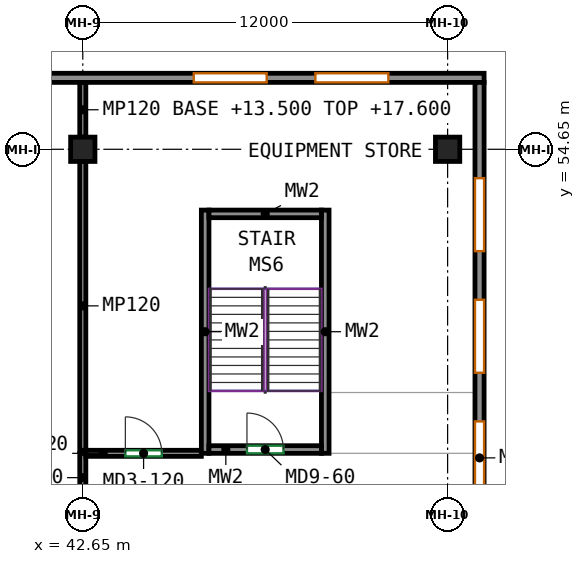
"""IFC4 building model, lengths in metres.
Left out: names, types, materials, properties, quantities, classifications, styles, units other than length and angle.
Written with IfcOpenShell. Run it as: python <this file> out.ifc"""

import sys

from ifc_helpers import new_model, si_unit, direction, frame, frame_2d, origin, origin_2d, place, context, subcontext, project, spatial, rectangle, extrude, source, transform, mapped, element, fill, save


model = new_model("IFC4")
c1 = context("Model", 3, precision=1e-05, world=origin(), true_north=direction((0.0, 1.0)))
c2 = subcontext(c1, "Body", "Model", "MODEL_VIEW")
j1 = project(units=[si_unit("LENGTHUNIT", "METRE"), si_unit("PLANEANGLEUNIT", "RADIAN")], contexts=[c1])
p1 = place(None, origin())
s1 = spatial("IfcSite", under=j1, at=p1, CompositionType="ELEMENT")
p2 = place(p1, origin())
s2 = spatial("IfcBuilding", under=s1, at=p2, CompositionType="ELEMENT")
p3 = place(p2, frame((0.0, 0.0, 13.5)))
s3 = spatial("IfcBuildingStorey", under=s2, at=p3, CompositionType="ELEMENT", Elevation=13.5)
m1 = source(origin(), c2, "Body", "SweptSolid", [
    extrude(rectangle(XDim=0.8, YDim=0.8, at=origin_2d()), origin(), (0.0, 0.0, 1.0), 4.1),
])
for number, where, z_axis, x_axis in (
    (1, (42.65, 54.65, 0.0), (0.0, 0.0, 1.0), (1.0, 0.0, 0.0)),
    (2, (54.65, 54.65, 0.0), (0.0, 0.0, 1.0), (1.0, 0.0, 0.0)),
):
    element("IfcColumn", number, at=place(p3, frame(where, z_axis=z_axis, x_axis=x_axis)), inside=s3, PredefinedType="COLUMN", context=c2, shape_type="MappedRepresentation", body=[
        mapped(m1, transform((0.0, 0.0, 0.0))),
    ])
m2 = source(origin(), c2, "Body", "SweptSolid", [
    extrude(rectangle(XDim=8.0, YDim=0.25, at=frame_2d((4.0, 0.0))), origin(), (0.0, 0.0, 1.0), 4.1),
])
for number, where, z_axis, x_axis in (
    (3, (46.675, 44.65, 0.0), (0.0, 0.0, 1.0), (0.0, 1.0, 0.0)),
    (4, (50.625, 44.65, 0.0), (0.0, 0.0, 1.0), (0.0, 1.0, 0.0)),
):
    element("IfcWall", number, at=place(p3, frame(where, z_axis=z_axis, x_axis=x_axis)), inside=s3, PredefinedType="SHEAR", context=c2, shape_type="MappedRepresentation", body=[
        mapped(m2, transform((0.0, 0.0, 0.0))),
    ])
m3 = source(origin(), c2, "Body", "SweptSolid", [
    extrude(rectangle(XDim=3.7, YDim=0.25, at=frame_2d((1.85, 0.0))), origin(), (0.0, 0.0, 1.0), 4.1),
])
p4 = place(p3, frame((46.8, 44.775, 0.0), z_axis=(0.0, 0.0, 1.0), x_axis=(1.0, 0.0, 0.0)))
e5 = element("IfcWall", 5, at=p4, inside=s3, PredefinedType="SHEAR", context=c2, shape_type="MappedRepresentation", body=[
    mapped(m3, transform((0.0, 0.0, 0.0))),
])
p5 = place(p4, frame((1.25, 0.0, 0.0)))
e6 = element("IfcOpeningElement", 6, at=p5, cuts=e5, PredefinedType="OPENING", context=c2, shape_type="SweptSolid", body=[
    extrude(rectangle(XDim=1.2, YDim=2.1, at=frame_2d((0.6, 1.05))), frame((0.0, 0.135, 0.0), z_axis=(0.0, -1.0, 0.0), x_axis=(1.0, 0.0, 0.0)), (0.0, 0.0, 1.0), 0.27),
])
p6 = place(p3, frame((46.8, 52.525, 0.0), z_axis=(0.0, 0.0, 1.0), x_axis=(1.0, 0.0, 0.0)))
e7 = element("IfcWall", 7, at=p6, inside=s3, PredefinedType="SHEAR", context=c2, shape_type="MappedRepresentation", body=[
    mapped(m3, transform((0.0, 0.0, 0.0))),
])
m4 = source(origin(), c2, "Body", "SweptSolid", [
    extrude(rectangle(XDim=112.7, YDim=0.3, at=frame_2d((56.35, 0.0))), origin(), (0.0, 0.0, 1.0), 4.1),
])
p7 = place(p3, frame((-56.85, 57.0, 0.0), z_axis=(0.0, 0.0, 1.0), x_axis=(1.0, 0.0, 0.0)))
e8 = element("IfcWall", 8, at=p7, inside=s3, PredefinedType="SOLIDWALL", context=c2, shape_type="MappedRepresentation", body=[
    mapped(m4, transform((0.0, 0.0, 0.0))),
])
p8 = place(p7, frame((3.15, 0.0, 0.9)))
e9 = element("IfcOpeningElement", 9, at=p8, cuts=e8, PredefinedType="OPENING", context=c2, shape_type="SweptSolid", body=[
    extrude(rectangle(XDim=2.4, YDim=1.8, at=frame_2d((1.2, 0.9))), frame((0.0, 0.16, 0.0), z_axis=(0.0, -1.0, 0.0), x_axis=(1.0, 0.0, 0.0)), (0.0, 0.0, 1.0), 0.32),
])
p9 = place(p7, frame((7.15, 0.0, 0.9)))
e10 = element("IfcOpeningElement", 10, at=p9, cuts=e8, PredefinedType="OPENING", context=c2, shape_type="SweptSolid", body=[
    extrude(rectangle(XDim=2.4, YDim=1.8, at=frame_2d((1.2, 0.9))), frame((0.0, 0.16, 0.0), z_axis=(0.0, -1.0, 0.0), x_axis=(1.0, 0.0, 0.0)), (0.0, 0.0, 1.0), 0.32),
])
p10 = place(p7, frame((11.15, 0.0, 0.9)))
e11 = element("IfcOpeningElement", 11, at=p10, cuts=e8, PredefinedType="OPENING", context=c2, shape_type="SweptSolid", body=[
    extrude(rectangle(XDim=2.4, YDim=1.8, at=frame_2d((1.2, 0.9))), frame((0.0, 0.16, 0.0), z_axis=(0.0, -1.0, 0.0), x_axis=(1.0, 0.0, 0.0)), (0.0, 0.0, 1.0), 0.32),
])
p11 = place(p7, frame((15.15, 0.0, 0.9)))
e12 = element("IfcOpeningElement", 12, at=p11, cuts=e8, PredefinedType="OPENING", context=c2, shape_type="SweptSolid", body=[
    extrude(rectangle(XDim=2.4, YDim=1.8, at=frame_2d((1.2, 0.9))), frame((0.0, 0.16, 0.0), z_axis=(0.0, -1.0, 0.0), x_axis=(1.0, 0.0, 0.0)), (0.0, 0.0, 1.0), 0.32),
])
p12 = place(p7, frame((19.15, 0.0, 0.9)))
e13 = element("IfcOpeningElement", 13, at=p12, cuts=e8, PredefinedType="OPENING", context=c2, shape_type="SweptSolid", body=[
    extrude(rectangle(XDim=2.4, YDim=1.8, at=frame_2d((1.2, 0.9))), frame((0.0, 0.16, 0.0), z_axis=(0.0, -1.0, 0.0), x_axis=(1.0, 0.0, 0.0)), (0.0, 0.0, 1.0), 0.32),
])
p13 = place(p7, frame((23.15, 0.0, 0.9)))
e14 = element("IfcOpeningElement", 14, at=p13, cuts=e8, PredefinedType="OPENING", context=c2, shape_type="SweptSolid", body=[
    extrude(rectangle(XDim=2.4, YDim=1.8, at=frame_2d((1.2, 0.9))), frame((0.0, 0.16, 0.0), z_axis=(0.0, -1.0, 0.0), x_axis=(1.0, 0.0, 0.0)), (0.0, 0.0, 1.0), 0.32),
])
p14 = place(p7, frame((27.15, 0.0, 0.9)))
e15 = element("IfcOpeningElement", 15, at=p14, cuts=e8, PredefinedType="OPENING", context=c2, shape_type="SweptSolid", body=[
    extrude(rectangle(XDim=2.4, YDim=1.8, at=frame_2d((1.2, 0.9))), frame((0.0, 0.16, 0.0), z_axis=(0.0, -1.0, 0.0), x_axis=(1.0, 0.0, 0.0)), (0.0, 0.0, 1.0), 0.32),
])
p15 = place(p7, frame((31.15, 0.0, 0.9)))
e16 = element("IfcOpeningElement", 16, at=p15, cuts=e8, PredefinedType="OPENING", context=c2, shape_type="SweptSolid", body=[
    extrude(rectangle(XDim=2.4, YDim=1.8, at=frame_2d((1.2, 0.9))), frame((0.0, 0.16, 0.0), z_axis=(0.0, -1.0, 0.0), x_axis=(1.0, 0.0, 0.0)), (0.0, 0.0, 1.0), 0.32),
])
p16 = place(p7, frame((35.15, 0.0, 0.9)))
e17 = element("IfcOpeningElement", 17, at=p16, cuts=e8, PredefinedType="OPENING", context=c2, shape_type="SweptSolid", body=[
    extrude(rectangle(XDim=2.4, YDim=1.8, at=frame_2d((1.2, 0.9))), frame((0.0, 0.16, 0.0), z_axis=(0.0, -1.0, 0.0), x_axis=(1.0, 0.0, 0.0)), (0.0, 0.0, 1.0), 0.32),
])
p17 = place(p7, frame((43.15, 0.0, 0.9)))
e18 = element("IfcOpeningElement", 18, at=p17, cuts=e8, PredefinedType="OPENING", context=c2, shape_type="SweptSolid", body=[
    extrude(rectangle(XDim=2.4, YDim=1.8, at=frame_2d((1.2, 0.9))), frame((0.0, 0.16, 0.0), z_axis=(0.0, -1.0, 0.0), x_axis=(1.0, 0.0, 0.0)), (0.0, 0.0, 1.0), 0.32),
])
p18 = place(p7, frame((47.15, 0.0, 0.9)))
e19 = element("IfcOpeningElement", 19, at=p18, cuts=e8, PredefinedType="OPENING", context=c2, shape_type="SweptSolid", body=[
    extrude(rectangle(XDim=2.4, YDim=1.8, at=frame_2d((1.2, 0.9))), frame((0.0, 0.16, 0.0), z_axis=(0.0, -1.0, 0.0), x_axis=(1.0, 0.0, 0.0)), (0.0, 0.0, 1.0), 0.32),
])
p19 = place(p7, frame((51.15, 0.0, 0.9)))
e20 = element("IfcOpeningElement", 20, at=p19, cuts=e8, PredefinedType="OPENING", context=c2, shape_type="SweptSolid", body=[
    extrude(rectangle(XDim=2.4, YDim=1.8, at=frame_2d((1.2, 0.9))), frame((0.0, 0.16, 0.0), z_axis=(0.0, -1.0, 0.0), x_axis=(1.0, 0.0, 0.0)), (0.0, 0.0, 1.0), 0.32),
])
p20 = place(p7, frame((55.15, 0.0, 0.9)))
e21 = element("IfcOpeningElement", 21, at=p20, cuts=e8, PredefinedType="OPENING", context=c2, shape_type="SweptSolid", body=[
    extrude(rectangle(XDim=2.4, YDim=1.8, at=frame_2d((1.2, 0.9))), frame((0.0, 0.16, 0.0), z_axis=(0.0, -1.0, 0.0), x_axis=(1.0, 0.0, 0.0)), (0.0, 0.0, 1.0), 0.32),
])
p21 = place(p7, frame((59.15, 0.0, 0.9)))
e22 = element("IfcOpeningElement", 22, at=p21, cuts=e8, PredefinedType="OPENING", context=c2, shape_type="SweptSolid", body=[
    extrude(rectangle(XDim=2.4, YDim=1.8, at=frame_2d((1.2, 0.9))), frame((0.0, 0.16, 0.0), z_axis=(0.0, -1.0, 0.0), x_axis=(1.0, 0.0, 0.0)), (0.0, 0.0, 1.0), 0.32),
])
p22 = place(p7, frame((63.15, 0.0, 0.9)))
e23 = element("IfcOpeningElement", 23, at=p22, cuts=e8, PredefinedType="OPENING", context=c2, shape_type="SweptSolid", body=[
    extrude(rectangle(XDim=2.4, YDim=1.8, at=frame_2d((1.2, 0.9))), frame((0.0, 0.16, 0.0), z_axis=(0.0, -1.0, 0.0), x_axis=(1.0, 0.0, 0.0)), (0.0, 0.0, 1.0), 0.32),
])
p23 = place(p7, frame((67.15, 0.0, 0.9)))
e24 = element("IfcOpeningElement", 24, at=p23, cuts=e8, PredefinedType="OPENING", context=c2, shape_type="SweptSolid", body=[
    extrude(rectangle(XDim=2.4, YDim=1.8, at=frame_2d((1.2, 0.9))), frame((0.0, 0.16, 0.0), z_axis=(0.0, -1.0, 0.0), x_axis=(1.0, 0.0, 0.0)), (0.0, 0.0, 1.0), 0.32),
])
p24 = place(p7, frame((71.15, 0.0, 0.9)))
e25 = element("IfcOpeningElement", 25, at=p24, cuts=e8, PredefinedType="OPENING", context=c2, shape_type="SweptSolid", body=[
    extrude(rectangle(XDim=2.4, YDim=1.8, at=frame_2d((1.2, 0.9))), frame((0.0, 0.16, 0.0), z_axis=(0.0, -1.0, 0.0), x_axis=(1.0, 0.0, 0.0)), (0.0, 0.0, 1.0), 0.32),
])
p25 = place(p7, frame((75.15, 0.0, 0.9)))
e26 = element("IfcOpeningElement", 26, at=p25, cuts=e8, PredefinedType="OPENING", context=c2, shape_type="SweptSolid", body=[
    extrude(rectangle(XDim=2.4, YDim=1.8, at=frame_2d((1.2, 0.9))), frame((0.0, 0.16, 0.0), z_axis=(0.0, -1.0, 0.0), x_axis=(1.0, 0.0, 0.0)), (0.0, 0.0, 1.0), 0.32),
])
p26 = place(p7, frame((79.15, 0.0, 0.9)))
e27 = element("IfcOpeningElement", 27, at=p26, cuts=e8, PredefinedType="OPENING", context=c2, shape_type="SweptSolid", body=[
    extrude(rectangle(XDim=2.4, YDim=1.8, at=frame_2d((1.2, 0.9))), frame((0.0, 0.16, 0.0), z_axis=(0.0, -1.0, 0.0), x_axis=(1.0, 0.0, 0.0)), (0.0, 0.0, 1.0), 0.32),
])
p27 = place(p7, frame((83.15, 0.0, 0.9)))
e28 = element("IfcOpeningElement", 28, at=p27, cuts=e8, PredefinedType="OPENING", context=c2, shape_type="SweptSolid", body=[
    extrude(rectangle(XDim=2.4, YDim=1.8, at=frame_2d((1.2, 0.9))), frame((0.0, 0.16, 0.0), z_axis=(0.0, -1.0, 0.0), x_axis=(1.0, 0.0, 0.0)), (0.0, 0.0, 1.0), 0.32),
])
p28 = place(p7, frame((87.15, 0.0, 0.9)))
e29 = element("IfcOpeningElement", 29, at=p28, cuts=e8, PredefinedType="OPENING", context=c2, shape_type="SweptSolid", body=[
    extrude(rectangle(XDim=2.4, YDim=1.8, at=frame_2d((1.2, 0.9))), frame((0.0, 0.16, 0.0), z_axis=(0.0, -1.0, 0.0), x_axis=(1.0, 0.0, 0.0)), (0.0, 0.0, 1.0), 0.32),
])
p29 = place(p7, frame((91.15, 0.0, 0.9)))
e30 = element("IfcOpeningElement", 30, at=p29, cuts=e8, PredefinedType="OPENING", context=c2, shape_type="SweptSolid", body=[
    extrude(rectangle(XDim=2.4, YDim=1.8, at=frame_2d((1.2, 0.9))), frame((0.0, 0.16, 0.0), z_axis=(0.0, -1.0, 0.0), x_axis=(1.0, 0.0, 0.0)), (0.0, 0.0, 1.0), 0.32),
])
p30 = place(p7, frame((95.15, 0.0, 0.9)))
e31 = element("IfcOpeningElement", 31, at=p30, cuts=e8, PredefinedType="OPENING", context=c2, shape_type="SweptSolid", body=[
    extrude(rectangle(XDim=2.4, YDim=1.8, at=frame_2d((1.2, 0.9))), frame((0.0, 0.16, 0.0), z_axis=(0.0, -1.0, 0.0), x_axis=(1.0, 0.0, 0.0)), (0.0, 0.0, 1.0), 0.32),
])
p31 = place(p7, frame((103.15, 0.0, 0.9)))
e32 = element("IfcOpeningElement", 32, at=p31, cuts=e8, PredefinedType="OPENING", context=c2, shape_type="SweptSolid", body=[
    extrude(rectangle(XDim=2.4, YDim=1.8, at=frame_2d((1.2, 0.9))), frame((0.0, 0.16, 0.0), z_axis=(0.0, -1.0, 0.0), x_axis=(1.0, 0.0, 0.0)), (0.0, 0.0, 1.0), 0.32),
])
p32 = place(p7, frame((107.15, 0.0, 0.9)))
e33 = element("IfcOpeningElement", 33, at=p32, cuts=e8, PredefinedType="OPENING", context=c2, shape_type="SweptSolid", body=[
    extrude(rectangle(XDim=2.4, YDim=1.8, at=frame_2d((1.2, 0.9))), frame((0.0, 0.16, 0.0), z_axis=(0.0, -1.0, 0.0), x_axis=(1.0, 0.0, 0.0)), (0.0, 0.0, 1.0), 0.32),
])
m5 = source(origin(), c2, "Body", "SweptSolid", [
    extrude(rectangle(XDim=24.7, YDim=0.3, at=frame_2d((12.35, 0.0))), origin(), (0.0, 0.0, 1.0), 4.1),
])
p33 = place(p3, frame((55.7, 56.85, 0.0), z_axis=(0.0, 0.0, 1.0), x_axis=(0.0, -1.0, 0.0)))
e34 = element("IfcWall", 34, at=p33, inside=s3, PredefinedType="SOLIDWALL", context=c2, shape_type="MappedRepresentation", body=[
    mapped(m5, transform((0.0, 0.0, 0.0))),
])
p34 = place(p33, frame((3.15, 0.0, 0.9)))
e35 = element("IfcOpeningElement", 35, at=p34, cuts=e34, PredefinedType="OPENING", context=c2, shape_type="SweptSolid", body=[
    extrude(rectangle(XDim=2.4, YDim=1.8, at=frame_2d((1.2, 0.9))), frame((0.0, 0.16, 0.0), z_axis=(0.0, -1.0, 0.0), x_axis=(1.0, 0.0, 0.0)), (0.0, 0.0, 1.0), 0.32),
])
p35 = place(p33, frame((7.15, 0.0, 0.9)))
e36 = element("IfcOpeningElement", 36, at=p35, cuts=e34, PredefinedType="OPENING", context=c2, shape_type="SweptSolid", body=[
    extrude(rectangle(XDim=2.4, YDim=1.8, at=frame_2d((1.2, 0.9))), frame((0.0, 0.16, 0.0), z_axis=(0.0, -1.0, 0.0), x_axis=(1.0, 0.0, 0.0)), (0.0, 0.0, 1.0), 0.32),
])
p36 = place(p33, frame((11.15, 0.0, 0.9)))
e37 = element("IfcOpeningElement", 37, at=p36, cuts=e34, PredefinedType="OPENING", context=c2, shape_type="SweptSolid", body=[
    extrude(rectangle(XDim=2.4, YDim=1.8, at=frame_2d((1.2, 0.9))), frame((0.0, 0.16, 0.0), z_axis=(0.0, -1.0, 0.0), x_axis=(1.0, 0.0, 0.0)), (0.0, 0.0, 1.0), 0.32),
])
p37 = place(p33, frame((15.15, 0.0, 0.9)))
e38 = element("IfcOpeningElement", 38, at=p37, cuts=e34, PredefinedType="OPENING", context=c2, shape_type="SweptSolid", body=[
    extrude(rectangle(XDim=2.4, YDim=1.8, at=frame_2d((1.2, 0.9))), frame((0.0, 0.16, 0.0), z_axis=(0.0, -1.0, 0.0), x_axis=(1.0, 0.0, 0.0)), (0.0, 0.0, 1.0), 0.32),
])
p38 = place(p33, frame((19.15, 0.0, 0.9)))
e39 = element("IfcOpeningElement", 39, at=p38, cuts=e34, PredefinedType="OPENING", context=c2, shape_type="SweptSolid", body=[
    extrude(rectangle(XDim=2.4, YDim=1.8, at=frame_2d((1.2, 0.9))), frame((0.0, 0.16, 0.0), z_axis=(0.0, -1.0, 0.0), x_axis=(1.0, 0.0, 0.0)), (0.0, 0.0, 1.0), 0.32),
])
m6 = source(origin(), c2, "Body", "SweptSolid", [
    extrude(rectangle(XDim=1.6, YDim=0.2, at=frame_2d((0.8, 0.0))), origin(), (0.0, 0.0, 1.0), 3.3),
])
p39 = place(p3, frame((42.65, 43.05, 0.0), z_axis=(0.0, 0.0, 1.0), x_axis=(0.0, 1.0, 0.0)))
e40 = element("IfcWall", 40, at=p39, inside=s3, PredefinedType="PARTITIONING", context=c2, shape_type="MappedRepresentation", body=[
    mapped(m6, transform((0.0, 0.0, 0.0))),
])
m7 = source(origin(), c2, "Body", "SweptSolid", [
    extrude(rectangle(XDim=3.8, YDim=0.2, at=frame_2d((1.9, 0.0))), origin(), (0.0, 0.0, 1.0), 3.3),
])
p40 = place(p3, frame((42.75, 44.65, 0.0), z_axis=(0.0, 0.0, 1.0), x_axis=(1.0, 0.0, 0.0)))
e41 = element("IfcWall", 41, at=p40, inside=s3, PredefinedType="PARTITIONING", context=c2, shape_type="MappedRepresentation", body=[
    mapped(m7, transform((0.0, 0.0, 0.0))),
])
p41 = place(p40, frame((1.3, 0.0, 0.0)))
e42 = element("IfcOpeningElement", 42, at=p41, cuts=e41, PredefinedType="OPENING", context=c2, shape_type="SweptSolid", body=[
    extrude(rectangle(XDim=1.2, YDim=2.1, at=frame_2d((0.6, 1.05))), frame((0.0, 0.11, 0.0), z_axis=(0.0, -1.0, 0.0), x_axis=(1.0, 0.0, 0.0)), (0.0, 0.0, 1.0), 0.22),
])
m8 = source(origin(), c2, "Body", "SweptSolid", [
    extrude(rectangle(XDim=9.5, YDim=0.2, at=frame_2d((4.75, 0.0))), origin(), (0.0, 0.0, 1.0), 3.3),
])
p42 = place(p3, frame((42.65, 54.25, 0.0), z_axis=(0.0, 0.0, 1.0), x_axis=(0.0, -1.0, 0.0)))
e43 = element("IfcWall", 43, at=p42, inside=s3, PredefinedType="PARTITIONING", context=c2, shape_type="MappedRepresentation", body=[
    mapped(m8, transform((0.0, 0.0, 0.0))),
])
m9 = source(origin(), c2, "Body", "SweptSolid", [
    extrude(rectangle(XDim=1.8, YDim=0.2, at=frame_2d((0.9, 0.0))), origin(), (0.0, 0.0, 1.0), 4.1),
])
p43 = place(p3, frame((42.65, 56.85, 0.0), z_axis=(0.0, 0.0, 1.0), x_axis=(0.0, -1.0, 0.0)))
e44 = element("IfcWall", 44, at=p43, inside=s3, PredefinedType="PARTITIONING", context=c2, shape_type="MappedRepresentation", body=[
    mapped(m9, transform((0.0, 0.0, 0.0))),
])
p44 = place(p31, origin())
e45 = element("IfcWindow", 45, at=p44, inside=s3, PartitioningType="SINGLE_PANEL", PredefinedType="WINDOW", context=c2, shape_type="SweptSolid", body=[
    extrude(rectangle(XDim=2.4, YDim=1.8, at=frame_2d((1.2, 0.9))), frame((0.0, 0.03, 0.0), z_axis=(0.0, -1.0, 0.0), x_axis=(1.0, 0.0, 0.0)), (0.0, 0.0, 1.0), 0.06),
])
fill(e32, e45)
p45 = place(p32, origin())
e46 = element("IfcWindow", 46, at=p45, inside=s3, PartitioningType="SINGLE_PANEL", PredefinedType="WINDOW", context=c2, shape_type="SweptSolid", body=[
    extrude(rectangle(XDim=2.4, YDim=1.8, at=frame_2d((1.2, 0.9))), frame((0.0, 0.03, 0.0), z_axis=(0.0, -1.0, 0.0), x_axis=(1.0, 0.0, 0.0)), (0.0, 0.0, 1.0), 0.06),
])
fill(e33, e46)
p46 = place(p34, origin())
e47 = element("IfcWindow", 47, at=p46, inside=s3, PartitioningType="SINGLE_PANEL", PredefinedType="WINDOW", context=c2, shape_type="SweptSolid", body=[
    extrude(rectangle(XDim=2.4, YDim=1.8, at=frame_2d((1.2, 0.9))), frame((0.0, 0.03, 0.0), z_axis=(0.0, -1.0, 0.0), x_axis=(1.0, 0.0, 0.0)), (0.0, 0.0, 1.0), 0.06),
])
fill(e35, e47)
p47 = place(p35, origin())
e48 = element("IfcWindow", 48, at=p47, inside=s3, PartitioningType="SINGLE_PANEL", PredefinedType="WINDOW", context=c2, shape_type="SweptSolid", body=[
    extrude(rectangle(XDim=2.4, YDim=1.8, at=frame_2d((1.2, 0.9))), frame((0.0, 0.03, 0.0), z_axis=(0.0, -1.0, 0.0), x_axis=(1.0, 0.0, 0.0)), (0.0, 0.0, 1.0), 0.06),
])
fill(e36, e48)
p48 = place(p36, origin())
e49 = element("IfcWindow", 49, at=p48, inside=s3, PartitioningType="SINGLE_PANEL", PredefinedType="WINDOW", context=c2, shape_type="SweptSolid", body=[
    extrude(rectangle(XDim=2.4, YDim=1.8, at=frame_2d((1.2, 0.9))), frame((0.0, 0.03, 0.0), z_axis=(0.0, -1.0, 0.0), x_axis=(1.0, 0.0, 0.0)), (0.0, 0.0, 1.0), 0.06),
])
fill(e37, e49)
p49 = place(p5, origin())
e50 = element("IfcDoor", 50, at=p49, inside=s3, OperationType="DOUBLE_DOOR_SINGLE_SWING", PredefinedType="DOOR", context=c2, shape_type="SweptSolid", body=[
    extrude(rectangle(XDim=1.2, YDim=2.1, at=frame_2d((0.6, 1.05))), frame((0.0, 0.025, 0.0), z_axis=(0.0, -1.0, 0.0), x_axis=(1.0, 0.0, 0.0)), (0.0, 0.0, 1.0), 0.05),
])
fill(e6, e50)
p50 = place(p41, origin())
e51 = element("IfcDoor", 51, at=p50, inside=s3, OperationType="SINGLE_SWING_LEFT", PredefinedType="DOOR", context=c2, shape_type="SweptSolid", body=[
    extrude(rectangle(XDim=1.2, YDim=2.1, at=frame_2d((0.6, 1.05))), frame((0.0, 0.025, 0.0), z_axis=(0.0, -1.0, 0.0), x_axis=(1.0, 0.0, 0.0)), (0.0, 0.0, 1.0), 0.05),
])
fill(e42, e51)
save(model, sys.argv[1])
